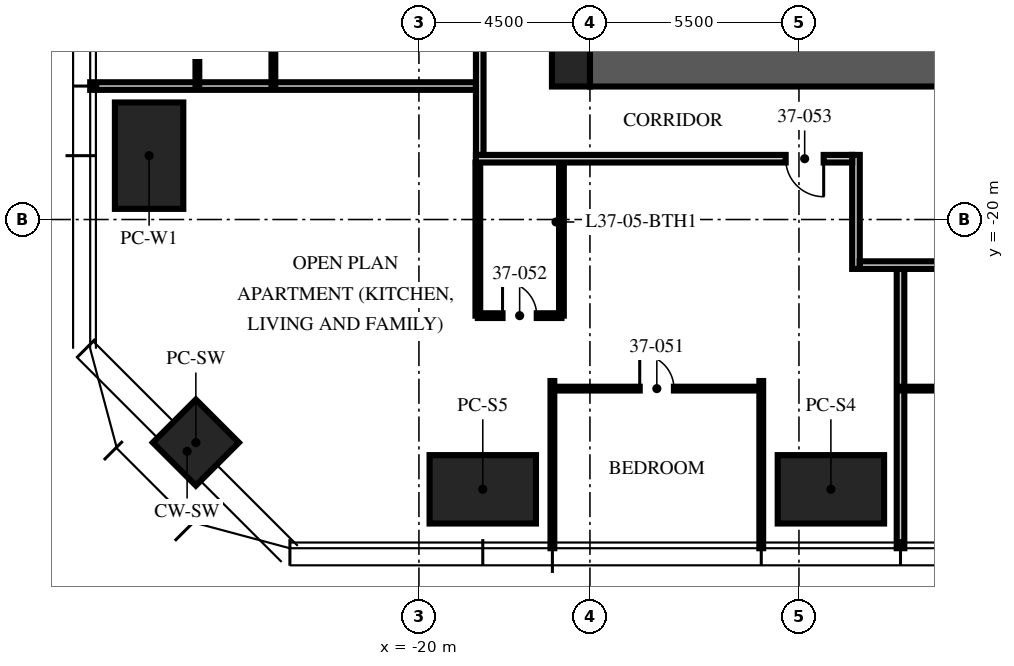
"""IFC4 building model, lengths in metres.
Left out: names, types, materials, properties, quantities, classifications, styles, units other than length and angle.
Written with IfcOpenShell. Run it as: python <this file> out.ifc"""

import sys

from ifc_helpers import new_model, si_unit, direction, frame, frame_2d, origin, origin_2d, place, context, subcontext, project, spatial, rectangle, extrude, element, fill, save


model = new_model("IFC4")
c1 = context("Model", 3, precision=1e-05, world=origin(), true_north=direction((0.0, 1.0)))
c2 = subcontext(c1, "Body", "Model", "MODEL_VIEW")
j1 = project(units=[si_unit("LENGTHUNIT", "METRE"), si_unit("PLANEANGLEUNIT", "RADIAN")], contexts=[c1])
p1 = place(None, origin())
s1 = spatial("IfcSite", under=j1, at=p1, CompositionType="ELEMENT")
p2 = place(p1, origin())
s2 = spatial("IfcBuilding", under=s1, at=p2, CompositionType="ELEMENT")
p3 = place(p2, frame((0.0, 0.0, 148.5)))
s3 = spatial("IfcBuildingStorey", under=s2, at=p3, CompositionType="ELEMENT", Elevation=148.5)
p4 = place(p3, frame((-15.5, -15.5, -0.25), z_axis=(0.0, 0.0, 1.0), x_axis=(1.0, 0.0, 0.0)))
e1 = element("IfcWall", 1, at=p4, inside=s3, PredefinedType="SHEAR", context=c2, shape_type="SweptSolid", body=[
    extrude(rectangle(XDim=31.0, YDim=2.0, at=frame_2d((15.5, 0.0))), origin(), (0.0, 0.0, 1.0), 3.75),
])
p5 = place(p4, frame((10.4, 0.0, 0.25)))
e2 = element("IfcOpeningElement", 2, at=p5, cuts=e1, PredefinedType="OPENING", context=c2, shape_type="SweptSolid", body=[
    extrude(rectangle(XDim=1.1, YDim=2.1, at=frame_2d((0.55, 1.05))), frame((0.0, 1.01, 0.0), z_axis=(0.0, -1.0, 0.0), x_axis=(1.0, 0.0, 0.0)), (0.0, 0.0, 1.0), 2.02),
])
p6 = place(p4, frame((13.5, 0.0, 0.25)))
e3 = element("IfcOpeningElement", 3, at=p6, cuts=e1, PredefinedType="OPENING", context=c2, shape_type="SweptSolid", body=[
    extrude(rectangle(XDim=1.1, YDim=2.1, at=frame_2d((0.55, 1.05))), frame((0.0, 1.01, 0.0), z_axis=(0.0, -1.0, 0.0), x_axis=(1.0, 0.0, 0.0)), (0.0, 0.0, 1.0), 2.02),
])
p7 = place(p4, frame((16.6, 0.0, 0.25)))
e4 = element("IfcOpeningElement", 4, at=p7, cuts=e1, PredefinedType="OPENING", context=c2, shape_type="SweptSolid", body=[
    extrude(rectangle(XDim=1.1, YDim=2.1, at=frame_2d((0.55, 1.05))), frame((0.0, 1.01, 0.0), z_axis=(0.0, -1.0, 0.0), x_axis=(1.0, 0.0, 0.0)), (0.0, 0.0, 1.0), 2.02),
])
p8 = place(p3, frame((-16.0, -16.0, -0.25), z_axis=(0.0, 0.0, 1.0), x_axis=(1.0, 0.0, 0.0)))
e5 = element("IfcColumn", 5, at=p8, inside=s3, PredefinedType="COLUMN", context=c2, shape_type="SweptSolid", body=[
    extrude(rectangle(XDim=1.0, YDim=1.0, at=origin_2d()), origin(), (0.0, 0.0, 1.0), 3.75),
])
for number, where, z_axis, x_axis in (
    (6, (-9.16, -27.1, 0.0), (0.0, 0.0, 1.0), (1.0, 0.0, 0.0)),
    (7, (-18.32, -27.1, 0.0), (0.0, 0.0, 1.0), (1.0, 0.0, 0.0)),
    (8, (-27.1, -18.32, 0.0), (0.0, 0.0, 1.0), (0.0, 1.0, 0.0)),
):
    element("IfcColumn", number, at=place(p3, frame(where, z_axis=z_axis, x_axis=x_axis)), inside=s3, PredefinedType="COLUMN", context=c2, shape_type="SweptSolid", body=[
        extrude(rectangle(XDim=2.8, YDim=1.8, at=origin_2d()), origin(), (0.0, 0.0, 1.0), 3.75),
    ])
p9 = place(p3, frame((-25.87, -25.87, 0.0), z_axis=(0.0, 0.0, 1.0), x_axis=(0.707106781187, -0.707106781187, 0.0)))
e9 = element("IfcColumn", 9, at=p9, inside=s3, PredefinedType="COLUMN", context=c2, shape_type="SweptSolid", body=[
    extrude(rectangle(XDim=1.6, YDim=1.6, at=origin_2d()), origin(), (0.0, 0.0, 1.0), 3.75),
])
p10 = place(p3, frame((-18.5, -16.488, 0.0), z_axis=(0.0, 0.0, 1.0), x_axis=(-1.0, 0.0, 0.0)))
e10 = element("IfcWall", 10, at=p10, inside=s3, PredefinedType="PARTITIONING", context=c2, shape_type="SweptSolid", body=[
    extrude(rectangle(XDim=10.15, YDim=0.2, at=frame_2d((5.075, 0.0))), origin(), (0.0, 0.0, 1.0), 2.81),
])
for number, where, z_axis, x_axis in (
    (11, (-16.488, -24.25, 0.0), (0.0, 0.0, 1.0), (0.0, -1.0, 0.0)),
    (12, (-10.992, -24.25, 0.0), (0.0, 0.0, 1.0), (0.0, -1.0, 0.0)),
):
    element("IfcWall", number, at=place(p3, frame(where, z_axis=z_axis, x_axis=x_axis)), inside=s3, PredefinedType="PARTITIONING", context=c2, shape_type="SweptSolid", body=[
        extrude(rectangle(XDim=4.4, YDim=0.1, at=frame_2d((2.2, 0.0))), origin(), (0.0, 0.0, 1.0), 2.81),
    ])
p11 = place(p3, frame((-7.328, -21.3, 0.0), z_axis=(0.0, 0.0, 1.0), x_axis=(0.0, -1.0, 0.0)))
e13 = element("IfcWall", 13, at=p11, inside=s3, PredefinedType="PARTITIONING", context=c2, shape_type="SweptSolid", body=[
    extrude(rectangle(XDim=7.35, YDim=0.2, at=frame_2d((3.675, 0.0))), origin(), (0.0, 0.0, 1.0), 2.81),
])
p12 = place(p3, frame((-25.83, -10.992, 0.0), z_axis=(0.0, 0.0, 1.0), x_axis=(0.0, -1.0, 0.0)))
e14 = element("IfcWall", 14, at=p12, inside=s3, PredefinedType="PARTITIONING", context=c2, shape_type="SweptSolid", body=[
    extrude(rectangle(XDim=5.496, YDim=0.1, at=frame_2d((2.748, 0.0))), origin(), (0.0, 0.0, 1.0), 2.81),
])
p13 = place(p12, frame((0.15, 0.0, 0.0)))
e15 = element("IfcOpeningElement", 15, at=p13, cuts=e14, PredefinedType="OPENING", context=c2, shape_type="SweptSolid", body=[
    extrude(rectangle(XDim=0.9, YDim=2.1, at=frame_2d((0.45, 1.05))), frame((0.0, 0.06, 0.0), z_axis=(0.0, -1.0, 0.0), x_axis=(1.0, 0.0, 0.0)), (0.0, 0.0, 1.0), 0.12),
])
p14 = place(p12, frame((2.898, 0.0, 0.0)))
e16 = element("IfcOpeningElement", 16, at=p14, cuts=e14, PredefinedType="OPENING", context=c2, shape_type="SweptSolid", body=[
    extrude(rectangle(XDim=0.9, YDim=2.1, at=frame_2d((0.45, 1.05))), frame((0.0, 0.06, 0.0), z_axis=(0.0, -1.0, 0.0), x_axis=(1.0, 0.0, 0.0)), (0.0, 0.0, 1.0), 0.12),
])
p15 = place(p3, frame((-23.83, -12.192, 0.0), z_axis=(0.0, 0.0, 1.0), x_axis=(0.0, -1.0, 0.0)))
e17 = element("IfcWall", 17, at=p15, inside=s3, PredefinedType="PARTITIONING", context=c2, shape_type="SweptSolid", body=[
    extrude(rectangle(XDim=4.296, YDim=0.1, at=frame_2d((2.148, 0.0))), origin(), (0.0, 0.0, 1.0), 2.81),
])
p16 = place(p3, frame((-16.488, -24.45, 0.0), z_axis=(0.0, 0.0, 1.0), x_axis=(1.0, 0.0, 0.0)))
e18 = element("IfcWall", 18, at=p16, inside=s3, PredefinedType="PARTITIONING", context=c2, shape_type="SweptSolid", body=[
    extrude(rectangle(XDim=5.496, YDim=0.1, at=frame_2d((2.748, 0.0))), origin(), (0.0, 0.0, 1.0), 2.81),
])
p17 = place(p16, frame((2.298, 0.0, 0.0)))
e19 = element("IfcOpeningElement", 19, at=p17, cuts=e18, PredefinedType="OPENING", context=c2, shape_type="SweptSolid", body=[
    extrude(rectangle(XDim=0.9, YDim=2.1, at=frame_2d((0.45, 1.05))), frame((0.0, 0.06, 0.0), z_axis=(0.0, -1.0, 0.0), x_axis=(1.0, 0.0, 0.0)), (0.0, 0.0, 1.0), 0.12),
])
p18 = place(p3, frame((-18.45, -22.53, 0.0), z_axis=(0.0, 0.0, 1.0), x_axis=(1.0, 0.0, 0.0)))
e20 = element("IfcWall", 20, at=p18, inside=s3, PredefinedType="PARTITIONING", context=c2, shape_type="SweptSolid", body=[
    extrude(rectangle(XDim=2.2, YDim=0.125, at=frame_2d((1.1, 0.0))), origin(), (0.0, 0.0, 1.0), 2.7),
])
p19 = place(p18, frame((0.65, 0.0, 0.0)))
e21 = element("IfcOpeningElement", 21, at=p19, cuts=e20, PredefinedType="OPENING", context=c2, shape_type="SweptSolid", body=[
    extrude(rectangle(XDim=0.9, YDim=2.1, at=frame_2d((0.45, 1.05))), frame((0.0, 0.073, 0.0), z_axis=(0.0, -1.0, 0.0), x_axis=(1.0, 0.0, 0.0)), (0.0, 0.0, 1.0), 0.145),
])
p20 = place(p3, frame((-18.45, -18.5, 0.0), z_axis=(0.0, 0.0, 1.0), x_axis=(0.0, -1.0, 0.0)))
e22 = element("IfcWall", 22, at=p20, inside=s3, PredefinedType="PARTITIONING", context=c2, shape_type="SweptSolid", body=[
    extrude(rectangle(XDim=4.03, YDim=0.125, at=frame_2d((2.015, 0.0))), origin(), (0.0, 0.0, 1.0), 2.3),
])
p21 = place(p3, frame((-16.25, -18.5, 0.0), z_axis=(0.0, 0.0, 1.0), x_axis=(0.0, -1.0, 0.0)))
e23 = element("IfcWall", 23, at=p21, inside=s3, PredefinedType="PARTITIONING", context=c2, shape_type="SweptSolid", body=[
    extrude(rectangle(XDim=4.03, YDim=0.125, at=frame_2d((2.015, 0.0))), origin(), (0.0, 0.0, 1.0), 3.5),
])
p22 = place(p3, frame((-7.328, -24.45, 0.0), z_axis=(0.0, 0.0, 1.0), x_axis=(1.0, 0.0, 0.0)))
e24 = element("IfcWall", 24, at=p22, inside=s3, PredefinedType="PARTITIONING", context=c2, shape_type="SweptSolid", body=[
    extrude(rectangle(XDim=5.496, YDim=0.1, at=frame_2d((2.748, 0.0))), origin(), (0.0, 0.0, 1.0), 2.81),
])
p23 = place(p22, frame((2.298, 0.0, 0.0)))
e25 = element("IfcOpeningElement", 25, at=p23, cuts=e24, PredefinedType="OPENING", context=c2, shape_type="SweptSolid", body=[
    extrude(rectangle(XDim=0.9, YDim=2.1, at=frame_2d((0.45, 1.05))), frame((0.0, 0.06, 0.0), z_axis=(0.0, -1.0, 0.0), x_axis=(1.0, 0.0, 0.0)), (0.0, 0.0, 1.0), 0.12),
])
p24 = place(p3, frame((-18.4, 5.328, 0.0), z_axis=(0.0, 0.0, 1.0), x_axis=(0.0, -1.0, 0.0)))
e26 = element("IfcWall", 26, at=p24, inside=s3, PredefinedType="PARTITIONING", context=c2, shape_type="SweptSolid", body=[
    extrude(rectangle(XDim=23.628, YDim=0.2, at=frame_2d((11.814, 0.0))), origin(), (0.0, 0.0, 1.0), 2.3),
])
p25 = place(p3, frame((-8.5, -18.3, 0.0), z_axis=(0.0, 0.0, 1.0), x_axis=(0.0, -1.0, 0.0)))
e27 = element("IfcWall", 27, at=p25, inside=s3, PredefinedType="PARTITIONING", context=c2, shape_type="SweptSolid", body=[
    extrude(rectangle(XDim=3.0, YDim=0.2, at=frame_2d((1.5, 0.0))), origin(), (0.0, 0.0, 1.0), 3.5),
])
p26 = place(p3, frame((5.4, -21.2, 0.0), z_axis=(0.0, 0.0, 1.0), x_axis=(-1.0, 0.0, 0.0)))
e28 = element("IfcWall", 28, at=p26, inside=s3, PredefinedType="PARTITIONING", context=c2, shape_type="SweptSolid", body=[
    extrude(rectangle(XDim=13.8, YDim=0.2, at=frame_2d((6.9, 0.0))), origin(), (0.0, 0.0, 1.0), 2.7),
])
p27 = place(p26, frame((0.958, 0.0, 0.0)))
e29 = element("IfcOpeningElement", 29, at=p27, cuts=e28, PredefinedType="OPENING", context=c2, shape_type="SweptSolid", body=[
    extrude(rectangle(XDim=1.0, YDim=2.2, at=frame_2d((0.5, 1.1))), frame((0.0, 0.11, 0.0), z_axis=(0.0, -1.0, 0.0), x_axis=(1.0, 0.0, 0.0)), (0.0, 0.0, 1.0), 0.22),
])
p28 = place(p3, frame((-8.6, -18.4, 0.0), z_axis=(0.0, 0.0, 1.0), x_axis=(-1.0, 0.0, 0.0)))
e30 = element("IfcWall", 30, at=p28, inside=s3, PredefinedType="PARTITIONING", context=c2, shape_type="SweptSolid", body=[
    extrude(rectangle(XDim=9.9, YDim=0.2, at=frame_2d((4.95, 0.0))), origin(), (0.0, 0.0, 1.0), 2.3),
])
p29 = place(p28, frame((0.75, 0.0, 0.0)))
e31 = element("IfcOpeningElement", 31, at=p29, cuts=e30, PredefinedType="OPENING", context=c2, shape_type="SweptSolid", body=[
    extrude(rectangle(XDim=1.0, YDim=2.2, at=frame_2d((0.5, 1.1))), frame((0.0, 0.11, 0.0), z_axis=(0.0, -1.0, 0.0), x_axis=(1.0, 0.0, 0.0)), (0.0, 0.0, 1.0), 0.22),
])
p30 = place(p17, origin())
e32 = element("IfcDoor", 32, at=p30, inside=s3, OperationType="SINGLE_SWING_LEFT", PredefinedType="DOOR", context=c2, shape_type="SweptSolid", body=[
    extrude(rectangle(XDim=0.9, YDim=2.1, at=frame_2d((0.45, 1.05))), frame((0.0, 0.025, 0.0), z_axis=(0.0, -1.0, 0.0), x_axis=(1.0, 0.0, 0.0)), (0.0, 0.0, 1.0), 0.05),
])
fill(e19, e32)
p31 = place(p19, origin())
e33 = element("IfcDoor", 33, at=p31, inside=s3, OperationType="SINGLE_SWING_LEFT", PredefinedType="DOOR", context=c2, shape_type="SweptSolid", body=[
    extrude(rectangle(XDim=0.9, YDim=2.1, at=frame_2d((0.45, 1.05))), frame((0.0, 0.025, 0.0), z_axis=(0.0, -1.0, 0.0), x_axis=(1.0, 0.0, 0.0)), (0.0, 0.0, 1.0), 0.05),
])
fill(e21, e33)
p32 = place(p29, origin())
e34 = element("IfcDoor", 34, at=p32, inside=s3, OperationType="SINGLE_SWING_LEFT", PredefinedType="DOOR", context=c2, shape_type="SweptSolid", body=[
    extrude(rectangle(XDim=1.0, YDim=2.2, at=frame_2d((0.5, 1.1))), frame((0.0, 0.025, 0.0), z_axis=(0.0, -1.0, 0.0), x_axis=(1.0, 0.0, 0.0)), (0.0, 0.0, 1.0), 0.05),
])
fill(e31, e34)
save(model, sys.argv[1])
